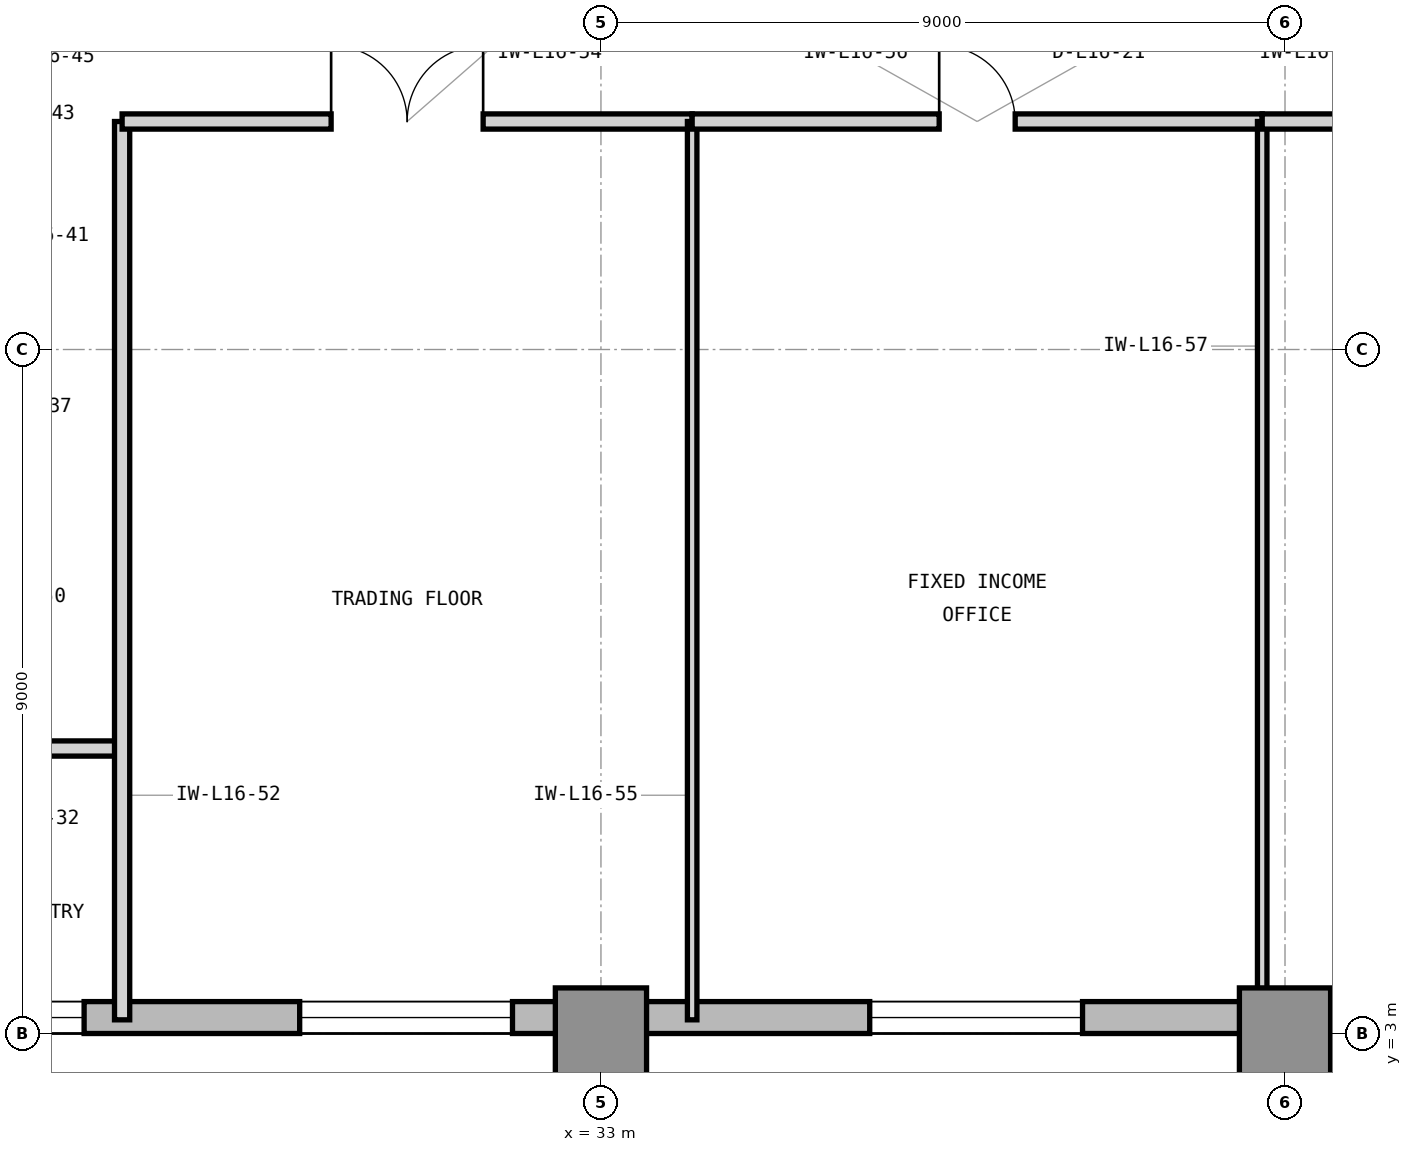
"""IFC4 building model, lengths in metres.
Left out: names, types, materials, properties, quantities, classifications, styles, units other than length and angle.
Written with IfcOpenShell. Run it as: python <this file> out.ifc"""

import sys

from ifc_helpers import new_model, si_unit, direction, frame, frame_2d, origin, origin_2d, place, context, subcontext, project, spatial, rectangle, extrude, element, fill, save


model = new_model("IFC4")
c1 = context("Model", 3, precision=1e-05, world=origin(), true_north=direction((0.0, 1.0)))
c2 = subcontext(c1, "Body", "Model", "MODEL_VIEW")
j1 = project(units=[si_unit("LENGTHUNIT", "METRE"), si_unit("PLANEANGLEUNIT", "RADIAN")], contexts=[c1])
p1 = place(None, origin())
s1 = spatial("IfcSite", under=j1, at=p1, CompositionType="ELEMENT")
p2 = place(p1, origin())
s2 = spatial("IfcBuilding", under=s1, at=p2, CompositionType="ELEMENT")
p3 = place(p2, frame((0.0, 0.0, 72.0)))
s3 = spatial("IfcBuildingStorey", under=s2, at=p3, CompositionType="ELEMENT", Elevation=72.0)
for number, where, z_axis, x_axis in (
    (1, (33.0, 3.0, 0.0), (0.0, 0.0, 1.0), (1.0, 0.0, 0.0)),
    (2, (42.0, 3.0, 0.0), (0.0, 0.0, 1.0), (1.0, 0.0, 0.0)),
):
    element("IfcColumn", number, at=place(p3, frame(where, z_axis=z_axis, x_axis=x_axis)), inside=s3, PredefinedType="COLUMN", context=c2, shape_type="SweptSolid", body=[
        extrude(rectangle(XDim=1.2, YDim=1.2, at=origin_2d()), origin(), (0.0, 0.0, 1.0), 4.2),
    ])
p4 = place(p3, frame((23.9, 3.21, 0.0), z_axis=(0.0, 0.0, 1.0), x_axis=(1.0, 0.0, 0.0)))
e3 = element("IfcWall", 3, at=p4, inside=s3, PredefinedType="STANDARD", context=c2, shape_type="SweptSolid", body=[
    extrude(rectangle(XDim=40.5, YDim=0.42, at=frame_2d((20.25, 0.0))), origin(), (0.0, 0.0, 1.0), 3.98),
])
p5 = place(p4, frame((1.1, 0.0, 0.85)))
e4 = element("IfcOpeningElement", 4, at=p5, cuts=e3, PredefinedType="OPENING", context=c2, shape_type="SweptSolid", body=[
    extrude(rectangle(XDim=1.2, YDim=2.45, at=frame_2d((0.6, 1.225))), frame((0.0, 0.22, 0.0), z_axis=(0.0, -1.0, 0.0), x_axis=(1.0, 0.0, 0.0)), (0.0, 0.0, 1.0), 0.44),
])
p6 = place(p4, frame((5.136, 0.0, 0.85)))
e5 = element("IfcOpeningElement", 5, at=p6, cuts=e3, PredefinedType="OPENING", context=c2, shape_type="SweptSolid", body=[
    extrude(rectangle(XDim=2.8, YDim=2.45, at=frame_2d((1.4, 1.225))), frame((0.0, 0.22, 0.0), z_axis=(0.0, -1.0, 0.0), x_axis=(1.0, 0.0, 0.0)), (0.0, 0.0, 1.0), 0.44),
])
p7 = place(p4, frame((12.636, 0.0, 0.85)))
e6 = element("IfcOpeningElement", 6, at=p7, cuts=e3, PredefinedType="OPENING", context=c2, shape_type="SweptSolid", body=[
    extrude(rectangle(XDim=2.8, YDim=2.45, at=frame_2d((1.4, 1.225))), frame((0.0, 0.22, 0.0), z_axis=(0.0, -1.0, 0.0), x_axis=(1.0, 0.0, 0.0)), (0.0, 0.0, 1.0), 0.44),
])
p8 = place(p4, frame((20.336, 0.0, 0.85)))
e7 = element("IfcOpeningElement", 7, at=p8, cuts=e3, PredefinedType="OPENING", context=c2, shape_type="SweptSolid", body=[
    extrude(rectangle(XDim=2.8, YDim=2.45, at=frame_2d((1.4, 1.225))), frame((0.0, 0.22, 0.0), z_axis=(0.0, -1.0, 0.0), x_axis=(1.0, 0.0, 0.0)), (0.0, 0.0, 1.0), 0.44),
])
p9 = place(p4, frame((30.886, 0.0, 0.85)))
e8 = element("IfcOpeningElement", 8, at=p9, cuts=e3, PredefinedType="OPENING", context=c2, shape_type="SweptSolid", body=[
    extrude(rectangle(XDim=1.2, YDim=2.45, at=frame_2d((0.6, 1.225))), frame((0.0, 0.22, 0.0), z_axis=(0.0, -1.0, 0.0), x_axis=(1.0, 0.0, 0.0)), (0.0, 0.0, 1.0), 0.44),
])
p10 = place(p3, frame((23.85, 6.75, 0.0), z_axis=(0.0, 0.0, 1.0), x_axis=(1.0, 0.0, 0.0)))
e9 = element("IfcWall", 9, at=p10, inside=s3, PredefinedType="PARTITIONING", context=c2, shape_type="SweptSolid", body=[
    extrude(rectangle(XDim=2.85, YDim=0.2, at=frame_2d((1.425, 0.0))), origin(), (0.0, 0.0, 1.0), 3.97),
])
p11 = place(p10, frame((0.7, 0.0, 0.0)))
e10 = element("IfcOpeningElement", 10, at=p11, cuts=e9, PredefinedType="OPENING", context=c2, shape_type="SweptSolid", body=[
    extrude(rectangle(XDim=1.0, YDim=2.15, at=frame_2d((0.5, 1.075))), frame((0.0, 0.11, 0.0), z_axis=(0.0, -1.0, 0.0), x_axis=(1.0, 0.0, 0.0)), (0.0, 0.0, 1.0), 0.22),
])
p12 = place(p3, frame((26.7, 3.18, 0.0), z_axis=(0.0, 0.0, 1.0), x_axis=(0.0, 1.0, 0.0)))
e11 = element("IfcWall", 11, at=p12, inside=s3, PredefinedType="PARTITIONING", context=c2, shape_type="SweptSolid", body=[
    extrude(rectangle(XDim=11.82, YDim=0.2, at=frame_2d((5.91, 0.0))), origin(), (0.0, 0.0, 1.0), 3.97),
])
p13 = place(p3, frame((26.7, 15.0, 0.0), z_axis=(0.0, 0.0, 1.0), x_axis=(1.0, 0.0, 0.0)))
e12 = element("IfcWall", 12, at=p13, inside=s3, PredefinedType="PARTITIONING", context=c2, shape_type="SweptSolid", body=[
    extrude(rectangle(XDim=7.5, YDim=0.2, at=frame_2d((3.75, 0.0))), origin(), (0.0, 0.0, 1.0), 3.426),
])
p14 = place(p13, frame((2.75, 0.0, 0.0)))
e13 = element("IfcOpeningElement", 13, at=p14, cuts=e12, PredefinedType="OPENING", context=c2, shape_type="SweptSolid", body=[
    extrude(rectangle(XDim=2.0, YDim=2.5, at=frame_2d((1.0, 1.25))), frame((0.0, 0.11, 0.0), z_axis=(0.0, -1.0, 0.0), x_axis=(1.0, 0.0, 0.0)), (0.0, 0.0, 1.0), 0.22),
])
p15 = place(p3, frame((34.2, 3.18, 0.0), z_axis=(0.0, 0.0, 1.0), x_axis=(0.0, 1.0, 0.0)))
e14 = element("IfcWall", 14, at=p15, inside=s3, PredefinedType="PARTITIONING", context=c2, shape_type="SweptSolid", body=[
    extrude(rectangle(XDim=11.82, YDim=0.125, at=frame_2d((5.91, 0.0))), origin(), (0.0, 0.0, 1.0), 3.97),
])
p16 = place(p3, frame((34.2, 15.0, 0.0), z_axis=(0.0, 0.0, 1.0), x_axis=(1.0, 0.0, 0.0)))
e15 = element("IfcWall", 15, at=p16, inside=s3, PredefinedType="PARTITIONING", context=c2, shape_type="SweptSolid", body=[
    extrude(rectangle(XDim=7.5, YDim=0.2, at=frame_2d((3.75, 0.0))), origin(), (0.0, 0.0, 1.0), 3.426),
])
p17 = place(p16, frame((3.25, 0.0, 0.0)))
e16 = element("IfcOpeningElement", 16, at=p17, cuts=e15, PredefinedType="OPENING", context=c2, shape_type="SweptSolid", body=[
    extrude(rectangle(XDim=1.0, YDim=2.15, at=frame_2d((0.5, 1.075))), frame((0.0, 0.11, 0.0), z_axis=(0.0, -1.0, 0.0), x_axis=(1.0, 0.0, 0.0)), (0.0, 0.0, 1.0), 0.22),
])
p18 = place(p3, frame((41.7, 3.18, 0.0), z_axis=(0.0, 0.0, 1.0), x_axis=(0.0, 1.0, 0.0)))
e17 = element("IfcWall", 17, at=p18, inside=s3, PredefinedType="PARTITIONING", context=c2, shape_type="SweptSolid", body=[
    extrude(rectangle(XDim=11.82, YDim=0.125, at=frame_2d((5.91, 0.0))), origin(), (0.0, 0.0, 1.0), 3.97),
])
p19 = place(p3, frame((41.7, 15.0, 0.0), z_axis=(0.0, 0.0, 1.0), x_axis=(1.0, 0.0, 0.0)))
e18 = element("IfcWall", 18, at=p19, inside=s3, PredefinedType="PARTITIONING", context=c2, shape_type="SweptSolid", body=[
    extrude(rectangle(XDim=9.0, YDim=0.2, at=frame_2d((4.5, 0.0))), origin(), (0.0, 0.0, 1.0), 3.426),
])
p20 = place(p19, frame((4.0, 0.0, 0.0)))
e19 = element("IfcOpeningElement", 19, at=p20, cuts=e18, PredefinedType="OPENING", context=c2, shape_type="SweptSolid", body=[
    extrude(rectangle(XDim=1.0, YDim=2.15, at=frame_2d((0.5, 1.075))), frame((0.0, 0.11, 0.0), z_axis=(0.0, -1.0, 0.0), x_axis=(1.0, 0.0, 0.0)), (0.0, 0.0, 1.0), 0.22),
])
p21 = place(p14, origin())
e20 = element("IfcDoor", 20, at=p21, inside=s3, OperationType="DOUBLE_DOOR_SINGLE_SWING", PredefinedType="DOOR", context=c2, shape_type="SweptSolid", body=[
    extrude(rectangle(XDim=2.0, YDim=2.5, at=frame_2d((1.0, 1.25))), frame((0.0, 0.025, 0.0), z_axis=(0.0, -1.0, 0.0), x_axis=(1.0, 0.0, 0.0)), (0.0, 0.0, 1.0), 0.05),
])
fill(e13, e20)
p22 = place(p17, origin())
e21 = element("IfcDoor", 21, at=p22, inside=s3, OperationType="SINGLE_SWING_LEFT", PredefinedType="DOOR", context=c2, shape_type="SweptSolid", body=[
    extrude(rectangle(XDim=1.0, YDim=2.15, at=frame_2d((0.5, 1.075))), frame((0.0, 0.025, 0.0), z_axis=(0.0, -1.0, 0.0), x_axis=(1.0, 0.0, 0.0)), (0.0, 0.0, 1.0), 0.05),
])
fill(e16, e21)
p23 = place(p5, origin())
e22 = element("IfcWindow", 22, at=p23, inside=s3, PartitioningType="SINGLE_PANEL", PredefinedType="WINDOW", context=c2, shape_type="SweptSolid", body=[
    extrude(rectangle(XDim=1.2, YDim=2.45, at=frame_2d((0.6, 1.225))), frame((0.0, 0.11, 0.0), z_axis=(0.0, -1.0, 0.0), x_axis=(1.0, 0.0, 0.0)), (0.0, 0.0, 1.0), 0.06),
])
fill(e4, e22)
p24 = place(p6, origin())
e23 = element("IfcWindow", 23, at=p24, inside=s3, PartitioningType="SINGLE_PANEL", PredefinedType="WINDOW", context=c2, shape_type="SweptSolid", body=[
    extrude(rectangle(XDim=2.8, YDim=2.45, at=frame_2d((1.4, 1.225))), frame((0.0, 0.11, 0.0), z_axis=(0.0, -1.0, 0.0), x_axis=(1.0, 0.0, 0.0)), (0.0, 0.0, 1.0), 0.06),
])
fill(e5, e23)
p25 = place(p7, origin())
e24 = element("IfcWindow", 24, at=p25, inside=s3, PartitioningType="SINGLE_PANEL", PredefinedType="WINDOW", context=c2, shape_type="SweptSolid", body=[
    extrude(rectangle(XDim=2.8, YDim=2.45, at=frame_2d((1.4, 1.225))), frame((0.0, 0.11, 0.0), z_axis=(0.0, -1.0, 0.0), x_axis=(1.0, 0.0, 0.0)), (0.0, 0.0, 1.0), 0.06),
])
fill(e6, e24)
save(model, sys.argv[1])
